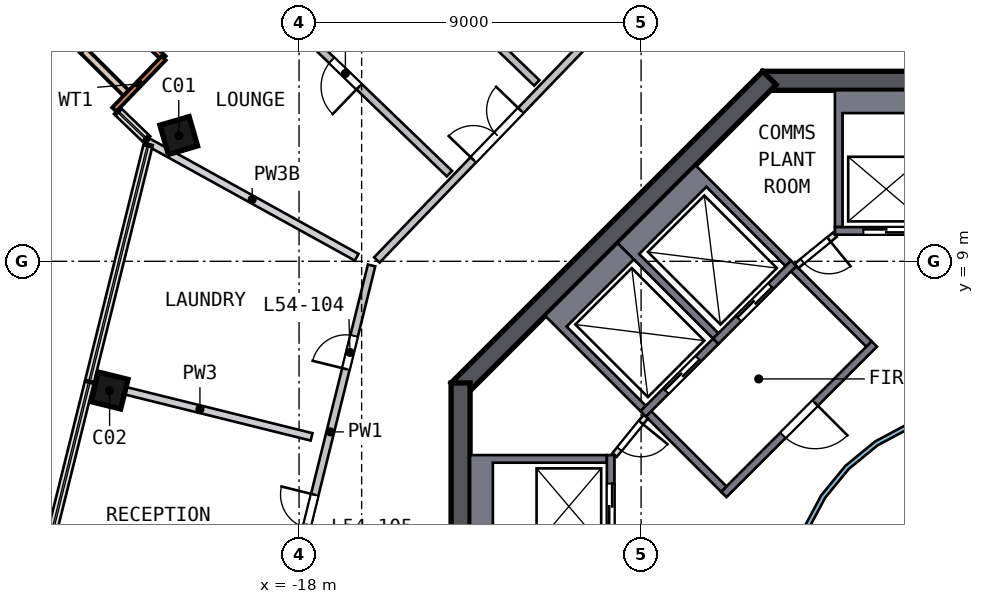
"""IFC4 building model, lengths in metres.
Left out: names, types, materials, properties, quantities, classifications, styles, units other than length and angle.
Written with IfcOpenShell. Run it as: python <this file> out.ifc"""

import sys

from ifc_helpers import new_model, si_unit, direction, frame, frame_2d, origin, origin_2d, place, context, subcontext, project, spatial, polyline, rectangle, outline, extrude, element, fill, save


model = new_model("IFC4")
c1 = context("Model", 3, precision=1e-05, world=origin(), true_north=direction((0.0, 1.0)))
c2 = subcontext(c1, "Body", "Model", "MODEL_VIEW")
j1 = project(units=[si_unit("LENGTHUNIT", "METRE"), si_unit("PLANEANGLEUNIT", "RADIAN")], contexts=[c1])
p1 = place(None, origin())
s1 = spatial("IfcSite", under=j1, at=p1, CompositionType="ELEMENT")
p2 = place(p1, origin())
s2 = spatial("IfcBuilding", under=s1, at=p2, CompositionType="ELEMENT")
p3 = place(p2, frame((0.0, 0.0, 222.0)))
s3 = spatial("IfcBuildingStorey", under=s2, at=p3, CompositionType="ELEMENT", Elevation=222.0)
p4 = place(p3, frame((-21.117, 12.394, 0.0), z_axis=(-0.040830981, -0.070870546, 0.996649485), x_axis=(-0.27945954, 0.958481417, 0.056707494)))
e1 = element("IfcColumn", 1, at=p4, inside=s3, PredefinedType="COLUMN", context=c2, shape_type="SweptSolid", body=[
    extrude(rectangle(XDim=0.8, YDim=0.8, at=origin_2d()), origin(), (0.0, 0.0, 1.0), 4.706),
])
p5 = place(p3, frame((-22.963, 5.691, 0.0), z_axis=(-0.018422156, -0.07685412, 0.996872142), x_axis=(-0.240534622, -0.96741801, -0.079028416)))
e2 = element("IfcColumn", 2, at=p5, inside=s3, PredefinedType="COLUMN", context=c2, shape_type="SweptSolid", body=[
    extrude(rectangle(XDim=0.8, YDim=0.8, at=origin_2d()), origin(), (0.0, 0.0, 1.0), 4.705),
])
p6 = place(p3, frame((5.799, 13.75, 0.0), z_axis=(0.0, 0.0, 1.0), x_axis=(-1.0, 0.0, 0.0)))
e3 = element("IfcWall", 3, at=p6, inside=s3, PredefinedType="SHEAR", context=c2, shape_type="SweptSolid", body=[
    extrude(rectangle(XDim=11.598, YDim=0.5, at=frame_2d((5.799, 0.0))), origin(), (0.0, 0.0, 1.0), 5.0),
])
p7 = place(p6, frame((4.899, 0.0, 0.0)))
e4 = element("IfcOpeningElement", 4, at=p7, cuts=e3, PredefinedType="OPENING", context=c2, shape_type="SweptSolid", body=[
    extrude(rectangle(XDim=1.8, YDim=2.1, at=frame_2d((0.9, 1.05))), frame((0.0, 0.26, 0.0), z_axis=(0.0, -1.0, 0.0), x_axis=(1.0, 0.0, 0.0)), (0.0, 0.0, 1.0), 0.52),
])
p8 = place(p3, frame((-5.622, 13.823, 0.0), z_axis=(0.0, 0.0, 1.0), x_axis=(-0.707106781, -0.707106781, 0.0)))
e5 = element("IfcWall", 5, at=p8, inside=s3, PredefinedType="SHEAR", context=c2, shape_type="SweptSolid", body=[
    extrude(rectangle(XDim=11.598, YDim=0.5, at=frame_2d((5.799, 0.0))), origin(), (0.0, 0.0, 1.0), 5.0),
])
p9 = place(p3, frame((-13.75, 5.799, 0.0), z_axis=(0.0, 0.0, 1.0), x_axis=(0.0, -1.0, 0.0)))
e6 = element("IfcWall", 6, at=p9, inside=s3, PredefinedType="SHEAR", context=c2, shape_type="SweptSolid", body=[
    extrude(rectangle(XDim=11.598, YDim=0.5, at=frame_2d((5.799, 0.0))), origin(), (0.0, 0.0, 1.0), 5.0),
])
p10 = place(p9, frame((4.899, 0.0, 0.0)))
e7 = element("IfcOpeningElement", 7, at=p10, cuts=e6, PredefinedType="OPENING", context=c2, shape_type="SweptSolid", body=[
    extrude(rectangle(XDim=1.8, YDim=2.1, at=frame_2d((0.9, 1.05))), frame((0.0, 0.26, 0.0), z_axis=(0.0, -1.0, 0.0), x_axis=(1.0, 0.0, 0.0)), (0.0, 0.0, 1.0), 0.52),
])
p11 = place(p3, frame((-22.914, 15.645, 0.0), z_axis=(0.0, 0.0, 1.0), x_axis=(0.720262386, -0.693701734, 0.0)))
e8 = element("IfcWall", 8, at=p11, inside=s3, PredefinedType="SOLIDWALL", context=c2, shape_type="SweptSolid", body=[
    extrude(rectangle(XDim=1.875, YDim=0.15, at=frame_2d((0.938, 0.0))), origin(), (0.0, 0.0, 1.0), 4.69),
])
p12 = place(p3, frame((-21.563, 14.344, 0.0), z_axis=(0.0, 0.0, 1.0), x_axis=(-0.69363418, -0.720327442, 0.0)))
e9 = element("IfcWall", 9, at=p12, inside=s3, PredefinedType="SOLIDWALL", context=c2, shape_type="SweptSolid", body=[
    extrude(rectangle(XDim=1.875, YDim=0.15, at=frame_2d((0.938, 0.0))), origin(), (0.0, 0.0, 1.0), 4.69),
])
p13 = place(p3, frame((-22.887, 15.514, 0.0), z_axis=(0.0, 0.0, 1.0), x_axis=(-0.69360672, -0.720353884, 0.0)))
e10 = element("IfcWall", 10, at=p13, inside=s3, PredefinedType="PARAPET", context=c2, shape_type="SweptSolid", body=[
    extrude(rectangle(XDim=1.342, YDim=0.2, at=frame_2d((0.671, 0.0))), origin(), (0.0, 0.0, 1.0), 1.1),
])
p14 = place(p3, frame((-23.677, 14.546, 0.0), z_axis=(0.0, 0.0, 1.0), x_axis=(0.708566075, -0.70564447, 0.0)))
e11 = element("IfcWall", 11, at=p14, inside=s3, PredefinedType="PARAPET", context=c2, shape_type="SweptSolid", body=[
    extrude(rectangle(XDim=1.588, YDim=0.2, at=frame_2d((0.794, 0.0))), origin(), (0.0, 0.0, 1.0), 1.1),
])
p15 = place(p3, origin())
e12 = element("IfcWall", 12, at=p15, inside=s3, PredefinedType="SOLIDWALL", context=c2, shape_type="SweptSolid", body=[
    extrude(outline(polyline([(-3.9, 13.5), (-1.2, 13.5), (-1.2, 9.9), (-1.4, 9.9), (-1.4, 12.9), (-3.7, 12.9), (-3.7, 9.9), (-3.9, 9.9), (-3.9, 13.5)])), origin(), (0.0, 0.0, 1.0), 4.69),
])
p16 = place(p3, frame((-1.2, 9.8, 0.0), z_axis=(0.0, 0.0, 1.0), x_axis=(-1.0, 0.0, 0.0)))
e13 = element("IfcWall", 13, at=p16, inside=s3, PredefinedType="SOLIDWALL", context=c2, shape_type="SweptSolid", body=[
    extrude(rectangle(XDim=2.7, YDim=0.2, at=frame_2d((1.35, 0.0))), origin(), (0.0, 0.0, 1.0), 4.69),
])
p17 = place(p16, frame((0.75, 0.0, 0.0)))
e14 = element("IfcOpeningElement", 14, at=p17, cuts=e13, PredefinedType="OPENING", context=c2, shape_type="SweptSolid", body=[
    extrude(rectangle(XDim=1.2, YDim=2.1, at=frame_2d((0.6, 1.05))), frame((0.0, 0.11, 0.0), z_axis=(0.0, -1.0, 0.0), x_axis=(1.0, 0.0, 0.0)), (0.0, 0.0, 1.0), 0.22),
])
p18 = place(p3, origin())
e15 = element("IfcWall", 15, at=p18, inside=s3, PredefinedType="SOLIDWALL", context=c2, shape_type="SweptSolid", body=[
    extrude(outline(polyline([(-13.5, 3.9), (-9.9, 3.9), (-9.9, 3.7), (-12.9, 3.7), (-12.9, 1.4), (-9.9, 1.4), (-9.9, 1.2), (-13.5, 1.2), (-13.5, 3.9)])), origin(), (0.0, 0.0, 1.0), 4.69),
])
p19 = place(p3, frame((-9.8, 1.2, 0.0), z_axis=(0.0, 0.0, 1.0), x_axis=(0.0, 1.0, 0.0)))
e16 = element("IfcWall", 16, at=p19, inside=s3, PredefinedType="SOLIDWALL", context=c2, shape_type="SweptSolid", body=[
    extrude(rectangle(XDim=2.7, YDim=0.2, at=frame_2d((1.35, 0.0))), origin(), (0.0, 0.0, 1.0), 4.69),
])
p20 = place(p19, frame((0.75, 0.0, 0.0)))
e17 = element("IfcOpeningElement", 17, at=p20, cuts=e16, PredefinedType="OPENING", context=c2, shape_type="SweptSolid", body=[
    extrude(rectangle(XDim=1.2, YDim=2.1, at=frame_2d((0.6, 1.05))), frame((0.0, 0.11, 0.0), z_axis=(0.0, -1.0, 0.0), x_axis=(1.0, 0.0, 0.0)), (0.0, 0.0, 1.0), 0.22),
])
p21 = place(p3, origin())
e18 = element("IfcWall", 18, at=p21, inside=s3, PredefinedType="SOLIDWALL", context=c2, shape_type="SweptSolid", body=[
    extrude(outline(polyline([(-9.617, 9.475), (-7.566, 11.526), (-5.056, 9.016), (-5.197, 8.874), (-7.283, 10.96), (-9.051, 9.192), (-6.965, 7.106), (-7.106, 6.965), (-9.617, 9.475)])), origin(), (0.0, 0.0, 1.0), 4.69),
])
p22 = place(p3, frame((-4.985, 8.945, 0.0), z_axis=(0.0, 0.0, 1.0), x_axis=(-0.707106781, -0.707106781, 0.0)))
e19 = element("IfcWall", 19, at=p22, inside=s3, PredefinedType="SOLIDWALL", context=c2, shape_type="SweptSolid", body=[
    extrude(rectangle(XDim=2.9, YDim=0.2, at=frame_2d((1.45, 0.0))), origin(), (0.0, 0.0, 1.0), 4.69),
])
p23 = place(p22, frame((0.85, 0.0, 0.0)))
e20 = element("IfcOpeningElement", 20, at=p23, cuts=e19, PredefinedType="OPENING", context=c2, shape_type="SweptSolid", body=[
    extrude(rectangle(XDim=1.2, YDim=2.1, at=frame_2d((0.6, 1.05))), frame((0.0, 0.11, 0.0), z_axis=(0.0, -1.0, 0.0), x_axis=(1.0, 0.0, 0.0)), (0.0, 0.0, 1.0), 0.22),
])
p24 = place(p3, origin())
e21 = element("IfcWall", 21, at=p24, inside=s3, PredefinedType="SOLIDWALL", context=c2, shape_type="SweptSolid", body=[
    extrude(outline(polyline([(-11.526, 7.566), (-9.617, 9.475), (-9.192, 9.051), (-10.96, 7.283), (-8.874, 5.197), (-9.016, 5.056), (-11.526, 7.566)])), origin(), (0.0, 0.0, 1.0), 4.69),
])
p25 = place(p3, frame((-7.036, 6.894, 0.0), z_axis=(0.0, 0.0, 1.0), x_axis=(-0.707106781, -0.707106781, 0.0)))
e22 = element("IfcWall", 22, at=p25, inside=s3, PredefinedType="SOLIDWALL", context=c2, shape_type="SweptSolid", body=[
    extrude(rectangle(XDim=2.7, YDim=0.2, at=frame_2d((1.35, 0.0))), origin(), (0.0, 0.0, 1.0), 4.69),
])
p26 = place(p25, frame((0.65, 0.0, 0.0)))
e23 = element("IfcOpeningElement", 23, at=p26, cuts=e22, PredefinedType="OPENING", context=c2, shape_type="SweptSolid", body=[
    extrude(rectangle(XDim=1.2, YDim=2.1, at=frame_2d((0.6, 1.05))), frame((0.0, 0.11, 0.0), z_axis=(0.0, -1.0, 0.0), x_axis=(1.0, 0.0, 0.0)), (0.0, 0.0, 1.0), 0.22),
])
p27 = place(p3, frame((-2.864, 6.823, 0.0), z_axis=(0.0, 0.0, 1.0), x_axis=(-0.707106781, -0.707106781, 0.0)))
e24 = element("IfcWall", 24, at=p27, inside=s3, PredefinedType="SOLIDWALL", context=c2, shape_type="SweptSolid", body=[
    extrude(rectangle(XDim=5.6, YDim=0.2, at=frame_2d((2.8, 0.0))), origin(), (0.0, 0.0, 1.0), 4.69),
])
p28 = place(p27, frame((2.2, 0.0, 0.0)))
e25 = element("IfcOpeningElement", 25, at=p28, cuts=e24, PredefinedType="OPENING", context=c2, shape_type="SweptSolid", body=[
    extrude(rectangle(XDim=1.2, YDim=2.1, at=frame_2d((0.6, 1.05))), frame((0.0, 0.11, 0.0), z_axis=(0.0, -1.0, 0.0), x_axis=(1.0, 0.0, 0.0)), (0.0, 0.0, 1.0), 0.22),
])
for number, where, z_axis, x_axis in (
    (26, (-3.005, 6.823, 0.0), (0.0, 0.0, 1.0), (-0.707, 0.707, 0.0)),
    (27, (-6.823, 3.005, 0.0), (0.0, 0.0, 1.0), (-0.707, 0.707, 0.0)),
):
    element("IfcWall", number, at=place(p3, frame(where, z_axis=z_axis, x_axis=x_axis)), inside=s3, PredefinedType="SOLIDWALL", context=c2, shape_type="SweptSolid", body=[
        extrude(rectangle(XDim=2.8, YDim=0.2, at=frame_2d((1.4, 0.0))), origin(), (0.0, 0.0, 1.0), 4.69),
    ])
p29 = place(p3, frame((-3.9, 9.7, 0.0), z_axis=(0.0, 0.0, 1.0), x_axis=(-0.775559878, -0.631274009, 0.0)))
e28 = element("IfcWall", 28, at=p29, inside=s3, PredefinedType="PARTITIONING", context=c2, shape_type="SweptSolid", body=[
    extrude(rectangle(XDim=1.308, YDim=0.15, at=frame_2d((0.654, 0.0))), origin(), (0.0, 0.0, 1.0), 4.69),
])
p30 = place(p29, frame((0.204, 0.0, 0.0)))
e29 = element("IfcOpeningElement", 29, at=p30, cuts=e28, PredefinedType="OPENING", context=c2, shape_type="SweptSolid", body=[
    extrude(rectangle(XDim=0.9, YDim=2.1, at=frame_2d((0.45, 1.05))), frame((0.0, 0.085, 0.0), z_axis=(0.0, -1.0, 0.0), x_axis=(1.0, 0.0, 0.0)), (0.0, 0.0, 1.0), 0.17),
])
p31 = place(p3, frame((-8.874, 4.914, 0.0), z_axis=(0.0, 0.0, 1.0), x_axis=(-0.631274009, -0.775559878, 0.0)))
e30 = element("IfcWall", 30, at=p31, inside=s3, PredefinedType="PARTITIONING", context=c2, shape_type="SweptSolid", body=[
    extrude(rectangle(XDim=1.308, YDim=0.15, at=frame_2d((0.654, 0.0))), origin(), (0.0, 0.0, 1.0), 4.69),
])
p32 = place(p31, frame((0.204, 0.0, 0.0)))
e31 = element("IfcOpeningElement", 31, at=p32, cuts=e30, PredefinedType="OPENING", context=c2, shape_type="SweptSolid", body=[
    extrude(rectangle(XDim=0.9, YDim=2.1, at=frame_2d((0.45, 1.05))), frame((0.0, 0.085, 0.0), z_axis=(0.0, -1.0, 0.0), x_axis=(1.0, 0.0, 0.0)), (0.0, 0.0, 1.0), 0.17),
])
p33 = place(p3, origin())
e32 = element("IfcWall", 32, at=p33, inside=s3, PredefinedType="SOLIDWALL", context=c2, shape_type="SweptSolid", body=[
    extrude(outline(polyline([(5.021, -0.999), (4.73, -1.959), (4.257, -2.844), (3.62, -3.62), (2.844, -4.257), (1.959, -4.73), (0.999, -5.021), (0.0, -5.12), (-0.999, -5.021), (-1.959, -4.73), (-2.844, -4.257), (-3.62, -3.62), (-4.257, -2.844), (-4.73, -1.959), (-5.021, -0.999), (-5.12, 0.0), (-5.021, 0.999), (-4.73, 1.959), (-4.257, 2.844), (-3.62, 3.62), (-2.844, 4.257), (-1.959, 4.73), (-0.999, 5.021), (0.0, 5.12), (0.999, 5.021), (1.959, 4.73), (2.844, 4.257), (3.62, 3.62), (4.257, 2.844), (4.73, 1.959), (5.021, 0.999), (5.12, 0.0), (5.021, -0.999)]), holes=[polyline([(4.904, 0.976), (4.619, 1.913), (4.157, 2.778), (3.535, 3.535), (2.778, 4.157), (1.913, 4.619), (0.976, 4.904), (0.0, 5.0), (-0.976, 4.904), (-1.913, 4.619), (-2.778, 4.157), (-3.535, 3.535), (-4.157, 2.778), (-4.619, 1.913), (-4.904, 0.976), (-5.0, 0.0), (-4.904, -0.976), (-4.619, -1.913), (-4.157, -2.778), (-3.535, -3.535), (-2.778, -4.157), (-1.913, -4.619), (-0.976, -4.904), (0.0, -5.0), (0.976, -4.904), (1.913, -4.619), (2.778, -4.157), (3.535, -3.535), (4.157, -2.778), (4.619, -1.913), (4.904, -0.976), (5.0, 0.0), (4.904, 0.976)])]), origin(), (0.0, 0.0, 1.0), 4.69),
])
p34 = place(p3, frame((-18.382, -0.346, 0.0), z_axis=(0.0, 0.0, 1.0), x_axis=(0.240585413, 0.970627971, 0.0)))
e33 = element("IfcWall", 33, at=p34, inside=s3, PredefinedType="SOLIDWALL", context=c2, shape_type="SweptSolid", body=[
    extrude(rectangle(XDim=9.517, YDim=0.2, at=frame_2d((4.758, 0.0))), origin(), (0.0, 0.0, 1.0), 4.69),
])
p35 = place(p34, frame((6.708, 0.0, 0.0)))
e34 = element("IfcOpeningElement", 34, at=p35, cuts=e33, PredefinedType="OPENING", context=c2, shape_type="SweptSolid", body=[
    extrude(rectangle(XDim=0.9, YDim=2.1, at=frame_2d((0.45, 1.05))), frame((0.0, 0.11, 0.0), z_axis=(0.0, -1.0, 0.0), x_axis=(1.0, 0.0, 0.0)), (0.0, 0.0, 1.0), 0.22),
])
p36 = place(p34, frame((1.5, 0.0, 0.0)))
e35 = element("IfcOpeningElement", 35, at=p36, cuts=e33, PredefinedType="OPENING", context=c2, shape_type="SweptSolid", body=[
    extrude(rectangle(XDim=1.8, YDim=2.1, at=frame_2d((0.9, 1.05))), frame((0.0, 0.11, 0.0), z_axis=(0.0, -1.0, 0.0), x_axis=(1.0, 0.0, 0.0)), (0.0, 0.0, 1.0), 0.22),
])
p37 = place(p3, frame((-15.953, 9.035, 0.0), z_axis=(0.0, 0.0, 1.0), x_axis=(0.693644775, 0.72031724, 0.0)))
e36 = element("IfcWall", 36, at=p37, inside=s3, PredefinedType="SOLIDWALL", context=c2, shape_type="SweptSolid", body=[
    extrude(rectangle(XDim=9.117, YDim=0.2, at=frame_2d((4.558, 0.0))), origin(), (0.0, 0.0, 1.0), 4.69),
])
p38 = place(p37, frame((3.661, 0.0, 0.0)))
e37 = element("IfcOpeningElement", 37, at=p38, cuts=e36, PredefinedType="OPENING", context=c2, shape_type="SweptSolid", body=[
    extrude(rectangle(XDim=1.8, YDim=2.1, at=frame_2d((0.9, 1.05))), frame((0.0, 0.11, 0.0), z_axis=(0.0, -1.0, 0.0), x_axis=(1.0, 0.0, 0.0)), (0.0, 0.0, 1.0), 0.22),
])
p39 = place(p3, frame((-14.044, 11.306, 0.0), z_axis=(0.0, 0.0, 1.0), x_axis=(-0.720312548, 0.693649647, 0.0)))
e38 = element("IfcWall", 38, at=p39, inside=s3, PredefinedType="SOLIDWALL", context=c2, shape_type="SweptSolid", body=[
    extrude(rectangle(XDim=11.198, YDim=0.2, at=frame_2d((5.599, 0.0))), origin(), (0.0, 0.0, 1.0), 4.69),
])
p40 = place(p39, frame((3.3, 0.0, 0.0)))
e39 = element("IfcOpeningElement", 39, at=p40, cuts=e38, PredefinedType="OPENING", context=c2, shape_type="SweptSolid", body=[
    extrude(rectangle(XDim=1.0, YDim=2.1, at=frame_2d((0.5, 1.05))), frame((0.0, 0.11, 0.0), z_axis=(0.0, -1.0, 0.0), x_axis=(1.0, 0.0, 0.0)), (0.0, 0.0, 1.0), 0.22),
])
p41 = place(p3, frame((-19.811, 21.462, 0.0), z_axis=(0.0, 0.0, 1.0), x_axis=(0.720312548, -0.693649647, 0.0)))
e40 = element("IfcWall", 40, at=p41, inside=s3, PredefinedType="SOLIDWALL", context=c2, shape_type="SweptSolid", body=[
    extrude(rectangle(XDim=11.198, YDim=0.2, at=frame_2d((5.599, 0.0))), origin(), (0.0, 0.0, 1.0), 4.69),
])
p42 = place(p41, frame((1.65, 0.0, 0.0)))
e41 = element("IfcOpeningElement", 41, at=p42, cuts=e40, PredefinedType="OPENING", context=c2, shape_type="SweptSolid", body=[
    extrude(rectangle(XDim=1.0, YDim=2.1, at=frame_2d((0.5, 1.05))), frame((0.0, 0.11, 0.0), z_axis=(0.0, -1.0, 0.0), x_axis=(1.0, 0.0, 0.0)), (0.0, 0.0, 1.0), 0.22),
])
p43 = place(p3, frame((-17.671, 4.38, 0.0), z_axis=(0.0, 0.0, 1.0), x_axis=(-0.970634009, 0.240561055, 0.0)))
e42 = element("IfcWall", 42, at=p43, inside=s3, PredefinedType="SOLIDWALL", context=c2, shape_type="SweptSolid", body=[
    extrude(rectangle(XDim=6.053, YDim=0.2, at=frame_2d((3.026, 0.0))), origin(), (0.0, 0.0, 1.0), 4.69),
])
p44 = place(p3, frame((-16.484, 9.107, 0.0), z_axis=(0.0, 0.0, 1.0), x_axis=(-0.875280499, 0.483615599, 0.0)))
e43 = element("IfcWall", 43, at=p44, inside=s3, PredefinedType="SOLIDWALL", context=c2, shape_type="SweptSolid", body=[
    extrude(rectangle(XDim=6.282, YDim=0.2, at=frame_2d((3.141, 0.0))), origin(), (0.0, 0.0, 1.0), 4.19),
])
p45 = place(p17, origin())
e44 = element("IfcDoor", 44, at=p45, inside=s3, OperationType="DOUBLE_DOOR_SLIDING", PredefinedType="DOOR", context=c2, shape_type="SweptSolid", body=[
    extrude(rectangle(XDim=1.2, YDim=2.1, at=frame_2d((0.6, 1.05))), frame((0.0, 0.025, 0.0), z_axis=(0.0, -1.0, 0.0), x_axis=(1.0, 0.0, 0.0)), (0.0, 0.0, 1.0), 0.05),
])
fill(e14, e44)
p46 = place(p20, origin())
e45 = element("IfcDoor", 45, at=p46, inside=s3, OperationType="DOUBLE_DOOR_SLIDING", PredefinedType="DOOR", context=c2, shape_type="SweptSolid", body=[
    extrude(rectangle(XDim=1.2, YDim=2.1, at=frame_2d((0.6, 1.05))), frame((0.0, 0.025, 0.0), z_axis=(0.0, -1.0, 0.0), x_axis=(1.0, 0.0, 0.0)), (0.0, 0.0, 1.0), 0.05),
])
fill(e17, e45)
p47 = place(p23, origin())
e46 = element("IfcDoor", 46, at=p47, inside=s3, OperationType="DOUBLE_DOOR_SLIDING", PredefinedType="DOOR", context=c2, shape_type="SweptSolid", body=[
    extrude(rectangle(XDim=1.2, YDim=2.1, at=frame_2d((0.6, 1.05))), frame((0.0, 0.025, 0.0), z_axis=(0.0, -1.0, 0.0), x_axis=(1.0, 0.0, 0.0)), (0.0, 0.0, 1.0), 0.05),
])
fill(e20, e46)
p48 = place(p26, origin())
e47 = element("IfcDoor", 47, at=p48, inside=s3, OperationType="DOUBLE_DOOR_SLIDING", PredefinedType="DOOR", context=c2, shape_type="SweptSolid", body=[
    extrude(rectangle(XDim=1.2, YDim=2.1, at=frame_2d((0.6, 1.05))), frame((0.0, 0.025, 0.0), z_axis=(0.0, -1.0, 0.0), x_axis=(1.0, 0.0, 0.0)), (0.0, 0.0, 1.0), 0.05),
])
fill(e23, e47)
p49 = place(p28, origin())
e48 = element("IfcDoor", 48, at=p49, inside=s3, OperationType="SINGLE_SWING_LEFT", PredefinedType="DOOR", context=c2, shape_type="SweptSolid", body=[
    extrude(rectangle(XDim=1.2, YDim=2.1, at=frame_2d((0.6, 1.05))), frame((0.0, 0.025, 0.0), z_axis=(0.0, -1.0, 0.0), x_axis=(1.0, 0.0, 0.0)), (0.0, 0.0, 1.0), 0.05),
])
fill(e25, e48)
p50 = place(p30, origin())
e49 = element("IfcDoor", 49, at=p50, inside=s3, OperationType="SINGLE_SWING_LEFT", PredefinedType="DOOR", context=c2, shape_type="SweptSolid", body=[
    extrude(rectangle(XDim=0.9, YDim=2.1, at=frame_2d((0.45, 1.05))), frame((0.0, 0.025, 0.0), z_axis=(0.0, -1.0, 0.0), x_axis=(1.0, 0.0, 0.0)), (0.0, 0.0, 1.0), 0.05),
])
fill(e29, e49)
p51 = place(p32, origin())
e50 = element("IfcDoor", 50, at=p51, inside=s3, OperationType="SINGLE_SWING_LEFT", PredefinedType="DOOR", context=c2, shape_type="SweptSolid", body=[
    extrude(rectangle(XDim=0.9, YDim=2.1, at=frame_2d((0.45, 1.05))), frame((0.0, 0.025, 0.0), z_axis=(0.0, -1.0, 0.0), x_axis=(1.0, 0.0, 0.0)), (0.0, 0.0, 1.0), 0.05),
])
fill(e31, e50)
p52 = place(p38, origin())
e51 = element("IfcDoor", 51, at=p52, inside=s3, OperationType="DOUBLE_DOOR_SINGLE_SWING", PredefinedType="DOOR", context=c2, shape_type="SweptSolid", body=[
    extrude(rectangle(XDim=1.8, YDim=2.1, at=frame_2d((0.9, 1.05))), frame((0.0, 0.025, 0.0), z_axis=(0.0, -1.0, 0.0), x_axis=(1.0, 0.0, 0.0)), (0.0, 0.0, 1.0), 0.05),
])
fill(e37, e51)
p53 = place(p40, origin())
e52 = element("IfcDoor", 52, at=p53, inside=s3, OperationType="SINGLE_SWING_LEFT", PredefinedType="DOOR", context=c2, shape_type="SweptSolid", body=[
    extrude(rectangle(XDim=1.0, YDim=2.1, at=frame_2d((0.5, 1.05))), frame((0.0, 0.025, 0.0), z_axis=(0.0, -1.0, 0.0), x_axis=(1.0, 0.0, 0.0)), (0.0, 0.0, 1.0), 0.05),
])
fill(e39, e52)
p54 = place(p35, origin())
e53 = element("IfcDoor", 53, at=p54, inside=s3, OperationType="SINGLE_SWING_LEFT", PredefinedType="DOOR", context=c2, shape_type="SweptSolid", body=[
    extrude(rectangle(XDim=0.9, YDim=2.1, at=frame_2d((0.45, 1.05))), frame((0.0, 0.025, 0.0), z_axis=(0.0, -1.0, 0.0), x_axis=(1.0, 0.0, 0.0)), (0.0, 0.0, 1.0), 0.05),
])
fill(e34, e53)
p55 = place(p36, origin())
e54 = element("IfcDoor", 54, at=p55, inside=s3, OperationType="DOUBLE_DOOR_SINGLE_SWING", PredefinedType="DOOR", context=c2, shape_type="SweptSolid", body=[
    extrude(rectangle(XDim=1.8, YDim=2.1, at=frame_2d((0.9, 1.05))), frame((0.0, 0.025, 0.0), z_axis=(0.0, -1.0, 0.0), x_axis=(1.0, 0.0, 0.0)), (0.0, 0.0, 1.0), 0.05),
])
fill(e35, e54)
save(model, sys.argv[1])
